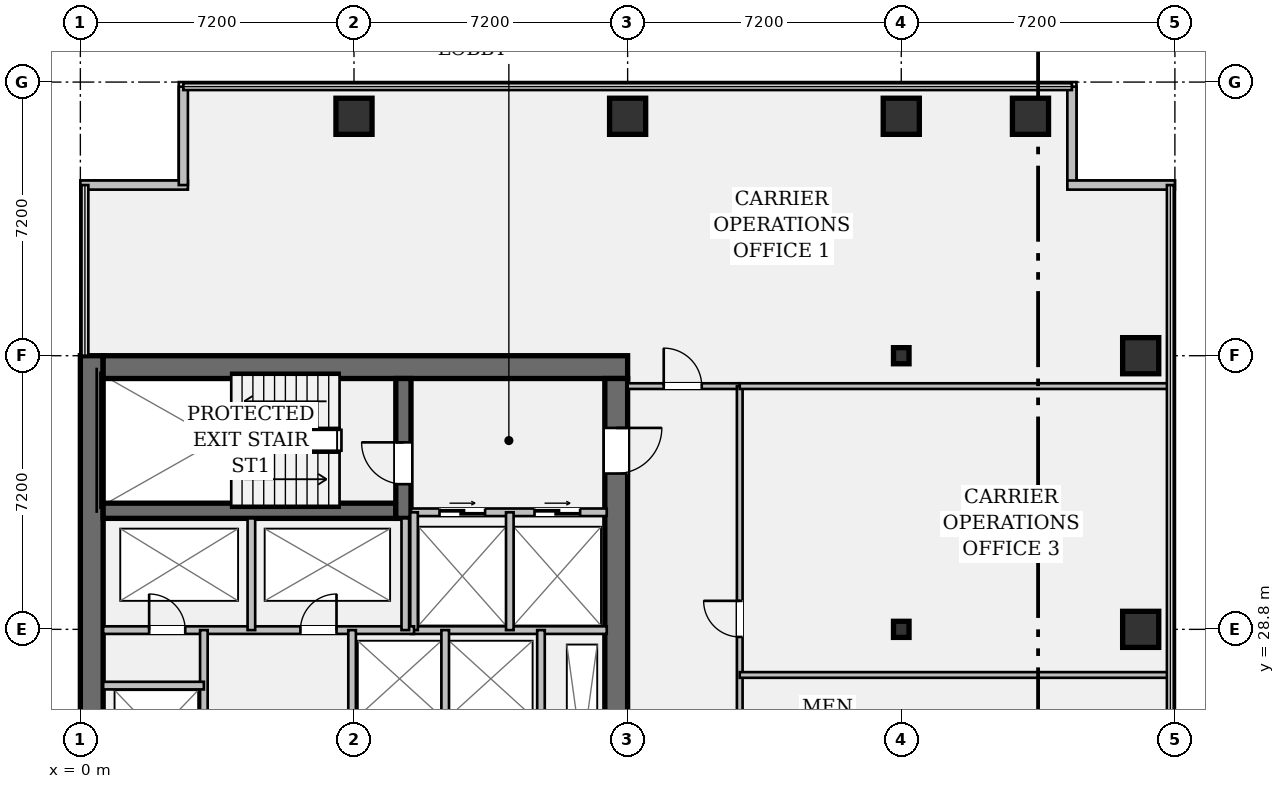
"""IFC4 building model, lengths in metres.
Left out: names, types, materials, properties, quantities, classifications, styles, units other than length and angle.
Written with IfcOpenShell. Run it as: python <this file> out.ifc"""

import sys

from ifc_helpers import new_model, si_unit, direction, frame, frame_2d, origin, origin_2d, place, context, subcontext, project, spatial, rectangle, hollow_rectangle, i_section, extrude, element, fill, save


model = new_model("IFC4")
c1 = context("Model", 3, precision=1e-05, world=origin(), true_north=direction((0.0, 1.0)))
c2 = subcontext(c1, "Body", "Model", "MODEL_VIEW")
j1 = project(units=[si_unit("LENGTHUNIT", "METRE"), si_unit("PLANEANGLEUNIT", "RADIAN")], contexts=[c1])
p1 = place(None, origin())
s1 = spatial("IfcSite", under=j1, at=p1, CompositionType="ELEMENT")
p2 = place(p1, origin())
s2 = spatial("IfcBuilding", under=s1, at=p2, CompositionType="ELEMENT")
p3 = place(p2, frame((0.0, 0.0, 85.05)))
s3 = spatial("IfcBuildingStorey", under=s2, at=p3, CompositionType="ELEMENT", Elevation=85.05)
p4 = place(p3, frame((0.3, 7.2, 0.0), z_axis=(0.0, 0.0, 1.0), x_axis=(0.0, 1.0, 0.0)))
e1 = element("IfcWall", 1, at=p4, inside=s3, PredefinedType="SHEAR", context=c2, shape_type="SweptSolid", body=[
    extrude(rectangle(XDim=28.8, YDim=0.6, at=frame_2d((14.4, 0.0))), origin(), (0.0, 0.0, 1.0), 3.57),
])
p5 = place(p3, frame((0.6, 35.7, 0.0), z_axis=(0.0, 0.0, 1.0), x_axis=(1.0, 0.0, 0.0)))
e2 = element("IfcWall", 2, at=p5, inside=s3, PredefinedType="SHEAR", context=c2, shape_type="SweptSolid", body=[
    extrude(rectangle(XDim=13.8, YDim=0.6, at=frame_2d((6.9, 0.0))), origin(), (0.0, 0.0, 1.0), 3.57),
])
p6 = place(p3, frame((14.1, 35.4, 0.0), z_axis=(0.0, 0.0, 1.0), x_axis=(0.0, -1.0, 0.0)))
e3 = element("IfcWall", 3, at=p6, inside=s3, PredefinedType="SHEAR", context=c2, shape_type="SweptSolid", body=[
    extrude(rectangle(XDim=27.6, YDim=0.6, at=frame_2d((13.8, 0.0))), origin(), (0.0, 0.0, 1.0), 3.57),
])
p7 = place(p6, frame((1.3, 0.0, 0.0)))
e4 = element("IfcOpeningElement", 4, at=p7, cuts=e3, PredefinedType="OPENING", context=c2, shape_type="SweptSolid", body=[
    extrude(rectangle(XDim=1.2, YDim=2.15, at=frame_2d((0.6, 1.075))), frame((0.0, 0.312, 0.0), z_axis=(0.0, -1.0, 0.0), x_axis=(1.0, 0.0, 0.0)), (0.0, 0.0, 1.0), 0.624),
])
p8 = place(p6, frame((25.25, 0.0, 0.0)))
e5 = element("IfcOpeningElement", 5, at=p8, cuts=e3, PredefinedType="OPENING", context=c2, shape_type="SweptSolid", body=[
    extrude(rectangle(XDim=1.2, YDim=2.15, at=frame_2d((0.6, 1.075))), frame((0.0, 0.312, 0.0), z_axis=(0.0, -1.0, 0.0), x_axis=(1.0, 0.0, 0.0)), (0.0, 0.0, 1.0), 0.624),
])
p9 = place(p6, frame((14.6, 0.0, 0.0)))
e6 = element("IfcOpeningElement", 6, at=p9, cuts=e3, PredefinedType="OPENING", context=c2, shape_type="SweptSolid", body=[
    extrude(rectangle(XDim=1.6, YDim=2.2, at=frame_2d((0.8, 1.1))), frame((0.0, 0.312, 0.0), z_axis=(0.0, -1.0, 0.0), x_axis=(1.0, 0.0, 0.0)), (0.0, 0.0, 1.0), 0.624),
])
p10 = place(p3, frame((0.6, 31.92, 0.0), z_axis=(0.0, 0.0, 1.0), x_axis=(1.0, 0.0, 0.0)))
e7 = element("IfcWall", 7, at=p10, inside=s3, PredefinedType="SHEAR", context=c2, shape_type="SweptSolid", body=[
    extrude(rectangle(XDim=7.7, YDim=0.4, at=frame_2d((3.85, 0.0))), origin(), (0.0, 0.0, 1.0), 3.57),
])
p11 = place(p3, frame((8.5, 31.72, 0.0), z_axis=(0.0, 0.0, 1.0), x_axis=(0.0, 1.0, 0.0)))
e8 = element("IfcWall", 8, at=p11, inside=s3, PredefinedType="SHEAR", context=c2, shape_type="SweptSolid", body=[
    extrude(rectangle(XDim=3.68, YDim=0.4, at=frame_2d((1.84, 0.0))), origin(), (0.0, 0.0, 1.0), 3.57),
])
p12 = place(p11, frame((0.9, 0.0, 0.0)))
e9 = element("IfcOpeningElement", 9, at=p12, cuts=e8, PredefinedType="OPENING", context=c2, shape_type="SweptSolid", body=[
    extrude(rectangle(XDim=1.1, YDim=2.15, at=frame_2d((0.55, 1.075))), frame((0.0, 0.212, 0.0), z_axis=(0.0, -1.0, 0.0), x_axis=(1.0, 0.0, 0.0)), (0.0, 0.0, 1.0), 0.424),
])
for number, where, z_axis, x_axis in (
    (10, (7.2, 42.3, 0.0), (0.0, 0.0, 1.0), (1.0, 0.0, 0.0)),
    (11, (14.4, 42.3, 0.0), (0.0, 0.0, 1.0), (1.0, 0.0, 0.0)),
):
    element("IfcColumn", number, at=place(p3, frame(where, z_axis=z_axis, x_axis=x_axis)), inside=s3, PredefinedType="COLUMN", context=c2, shape_type="SweptSolid", body=[
        extrude(hollow_rectangle(XDim=0.95, YDim=0.95, WallThickness=0.06, at=origin_2d()), origin(), (0.0, 0.0, 1.0), 3.57),
    ])
for number, where, z_axis, x_axis in (
    (12, (21.6, 28.8, 0.0), (0.0, 0.0, 1.0), (1.0, 0.0, 0.0)),
    (13, (21.6, 36.0, 0.0), (0.0, 0.0, 1.0), (1.0, 0.0, 0.0)),
):
    element("IfcColumn", number, at=place(p3, frame(where, z_axis=z_axis, x_axis=x_axis)), inside=s3, PredefinedType="COLUMN", context=c2, shape_type="SweptSolid", body=[
        extrude(i_section(OverallWidth=0.409, OverallDepth=0.424, WebThickness=0.033, FlangeThickness=0.052, FilletRadius=0.018, at=origin_2d()), origin(), (0.0, 0.0, 1.0), 3.57),
    ])
for number, where, z_axis, x_axis in (
    (14, (21.6, 42.3, 0.0), (0.0, 0.0, 1.0), (1.0, 0.0, 0.0)),
    (15, (25.0, 42.3, 0.0), (0.0, 0.0, 1.0), (1.0, 0.0, 0.0)),
    (16, (27.9, 28.8, 0.0), (0.0, 0.0, 1.0), (1.0, 0.0, 0.0)),
    (17, (27.9, 36.0, 0.0), (0.0, 0.0, 1.0), (1.0, 0.0, 0.0)),
):
    element("IfcColumn", number, at=place(p3, frame(where, z_axis=z_axis, x_axis=x_axis)), inside=s3, PredefinedType="COLUMN", context=c2, shape_type="SweptSolid", body=[
        extrude(hollow_rectangle(XDim=0.95, YDim=0.95, WallThickness=0.06, at=origin_2d()), origin(), (0.0, 0.0, 1.0), 3.57),
    ])
p13 = place(p3, frame((0.0, 40.49, 0.0), z_axis=(0.0, 0.0, 1.0), x_axis=(1.0, 0.0, 0.0)))
e18 = element("IfcWall", 18, at=p13, inside=s3, PredefinedType="STANDARD", context=c2, shape_type="SweptSolid", body=[
    extrude(rectangle(XDim=2.83, YDim=0.24, at=frame_2d((1.415, 0.0))), origin(), (0.0, 0.0, 1.0), 3.57),
])
for number, where, z_axis, x_axis in (
    (19, (2.71, 40.49, 0.0), (0.0, 0.0, 1.0), (0.0, 1.0, 0.0)),
    (20, (26.09, 43.08, 0.0), (0.0, 0.0, 1.0), (0.0, -1.0, 0.0)),
):
    element("IfcWall", number, at=place(p3, frame(where, z_axis=z_axis, x_axis=x_axis)), inside=s3, PredefinedType="STANDARD", context=c2, shape_type="SweptSolid", body=[
        extrude(rectangle(XDim=2.59, YDim=0.24, at=frame_2d((1.295, 0.0))), origin(), (0.0, 0.0, 1.0), 3.57),
    ])
p14 = place(p3, frame((25.97, 40.49, 0.0), z_axis=(0.0, 0.0, 1.0), x_axis=(1.0, 0.0, 0.0)))
e21 = element("IfcWall", 21, at=p14, inside=s3, PredefinedType="STANDARD", context=c2, shape_type="SweptSolid", body=[
    extrude(rectangle(XDim=2.83, YDim=0.24, at=frame_2d((1.415, 0.0))), origin(), (0.0, 0.0, 1.0), 3.57),
])
p15 = place(p3, frame((8.7, 31.88, 0.0), z_axis=(0.0, 0.0, 1.0), x_axis=(1.0, 0.0, 0.0)))
e22 = element("IfcWall", 22, at=p15, inside=s3, PredefinedType="PARTITIONING", context=c2, shape_type="SweptSolid", body=[
    extrude(rectangle(XDim=5.15, YDim=0.2, at=frame_2d((2.575, 0.0))), origin(), (0.0, 0.0, 1.0), 3.57),
])
p16 = place(p15, frame((0.75, 0.0, 0.0)))
e23 = element("IfcOpeningElement", 23, at=p16, cuts=e22, PredefinedType="OPENING", context=c2, shape_type="SweptSolid", body=[
    extrude(rectangle(XDim=1.2, YDim=2.2, at=frame_2d((0.6, 1.1))), frame((0.0, 0.112, 0.0), z_axis=(0.0, -1.0, 0.0), x_axis=(1.0, 0.0, 0.0)), (0.0, 0.0, 1.0), 0.224),
])
p17 = place(p15, frame((3.25, 0.0, 0.0)))
e24 = element("IfcOpeningElement", 24, at=p17, cuts=e22, PredefinedType="OPENING", context=c2, shape_type="SweptSolid", body=[
    extrude(rectangle(XDim=1.2, YDim=2.2, at=frame_2d((0.6, 1.1))), frame((0.0, 0.112, 0.0), z_axis=(0.0, -1.0, 0.0), x_axis=(1.0, 0.0, 0.0)), (0.0, 0.0, 1.0), 0.224),
])
p18 = place(p3, frame((8.7, 28.78, 0.0), z_axis=(0.0, 0.0, 1.0), x_axis=(1.0, 0.0, 0.0)))
e25 = element("IfcWall", 25, at=p18, inside=s3, PredefinedType="PARTITIONING", context=c2, shape_type="SweptSolid", body=[
    extrude(rectangle(XDim=5.15, YDim=0.2, at=frame_2d((2.575, 0.0))), origin(), (0.0, 0.0, 1.0), 3.57),
])
for number, where, z_axis, x_axis in (
    (26, (8.78, 28.78, 0.0), (0.0, 0.0, 1.0), (0.0, 1.0, 0.0)),
    (27, (11.3, 28.78, 0.0), (0.0, 0.0, 1.0), (0.0, 1.0, 0.0)),
):
    element("IfcWall", number, at=place(p3, frame(where, z_axis=z_axis, x_axis=x_axis)), inside=s3, PredefinedType="PARTITIONING", context=c2, shape_type="SweptSolid", body=[
        extrude(rectangle(XDim=3.1, YDim=0.2, at=frame_2d((1.55, 0.0))), origin(), (0.0, 0.0, 1.0), 3.57),
    ])
p19 = place(p3, frame((0.6, 28.78, 0.0), z_axis=(0.0, 0.0, 1.0), x_axis=(1.0, 0.0, 0.0)))
e28 = element("IfcWall", 28, at=p19, inside=s3, PredefinedType="PARTITIONING", context=c2, shape_type="SweptSolid", body=[
    extrude(rectangle(XDim=8.18, YDim=0.2, at=frame_2d((4.09, 0.0))), origin(), (0.0, 0.0, 1.0), 3.57),
])
p20 = place(p19, frame((1.21, 0.0, 0.0)))
e29 = element("IfcOpeningElement", 29, at=p20, cuts=e28, PredefinedType="OPENING", context=c2, shape_type="SweptSolid", body=[
    extrude(rectangle(XDim=0.95, YDim=2.15, at=frame_2d((0.475, 1.075))), frame((0.0, 0.112, 0.0), z_axis=(0.0, -1.0, 0.0), x_axis=(1.0, 0.0, 0.0)), (0.0, 0.0, 1.0), 0.224),
])
p21 = place(p19, frame((5.19, 0.0, 0.0)))
e30 = element("IfcOpeningElement", 30, at=p21, cuts=e28, PredefinedType="OPENING", context=c2, shape_type="SweptSolid", body=[
    extrude(rectangle(XDim=0.95, YDim=2.15, at=frame_2d((0.475, 1.075))), frame((0.0, 0.112, 0.0), z_axis=(0.0, -1.0, 0.0), x_axis=(1.0, 0.0, 0.0)), (0.0, 0.0, 1.0), 0.224),
])
for number, where, z_axis, x_axis in (
    (31, (4.5, 28.78, 0.0), (0.0, 0.0, 1.0), (0.0, 1.0, 0.0)),
    (32, (8.55, 28.78, 0.0), (0.0, 0.0, 1.0), (0.0, 1.0, 0.0)),
):
    element("IfcWall", number, at=place(p3, frame(where, z_axis=z_axis, x_axis=x_axis)), inside=s3, PredefinedType="PARTITIONING", context=c2, shape_type="SweptSolid", body=[
        extrude(rectangle(XDim=2.94, YDim=0.2, at=frame_2d((1.47, 0.0))), origin(), (0.0, 0.0, 1.0), 3.57),
    ])
p22 = place(p3, frame((3.25, 15.7, 0.0), z_axis=(0.0, 0.0, 1.0), x_axis=(0.0, 1.0, 0.0)))
e33 = element("IfcWall", 33, at=p22, inside=s3, PredefinedType="PARTITIONING", context=c2, shape_type="SweptSolid", body=[
    extrude(rectangle(XDim=13.08, YDim=0.2, at=frame_2d((6.54, 0.0))), origin(), (0.0, 0.0, 1.0), 3.57),
])
p23 = place(p3, frame((0.6, 27.32, 0.0), z_axis=(0.0, 0.0, 1.0), x_axis=(1.0, 0.0, 0.0)))
e34 = element("IfcWall", 34, at=p23, inside=s3, PredefinedType="PARTITIONING", context=c2, shape_type="SweptSolid", body=[
    extrude(rectangle(XDim=2.65, YDim=0.2, at=frame_2d((1.325, 0.0))), origin(), (0.0, 0.0, 1.0), 3.57),
])
for number, where, z_axis, x_axis in (
    (35, (7.15, 26.4, 0.0), (0.0, 0.0, 1.0), (0.0, 1.0, 0.0)),
    (36, (9.6, 26.4, 0.0), (0.0, 0.0, 1.0), (0.0, 1.0, 0.0)),
):
    element("IfcWall", number, at=place(p3, frame(where, z_axis=z_axis, x_axis=x_axis)), inside=s3, PredefinedType="PARTITIONING", context=c2, shape_type="SweptSolid", body=[
        extrude(rectangle(XDim=2.38, YDim=0.2, at=frame_2d((1.19, 0.0))), origin(), (0.0, 0.0, 1.0), 3.57),
    ])
p24 = place(p3, frame((12.12, 22.2, 0.0), z_axis=(0.0, 0.0, 1.0), x_axis=(0.0, 1.0, 0.0)))
e37 = element("IfcWall", 37, at=p24, inside=s3, PredefinedType="PARTITIONING", context=c2, shape_type="SweptSolid", body=[
    extrude(rectangle(XDim=6.58, YDim=0.2, at=frame_2d((3.29, 0.0))), origin(), (0.0, 0.0, 1.0), 3.57),
])
p25 = place(p24, frame((2.75, 0.0, 0.0)))
e38 = element("IfcOpeningElement", 38, at=p25, cuts=e37, PredefinedType="OPENING", context=c2, shape_type="SweptSolid", body=[
    extrude(rectangle(XDim=0.85, YDim=2.15, at=frame_2d((0.425, 1.075))), frame((0.0, 0.112, 0.0), z_axis=(0.0, -1.0, 0.0), x_axis=(1.0, 0.0, 0.0)), (0.0, 0.0, 1.0), 0.224),
])
p26 = place(p3, frame((14.4, 35.2, 0.0), z_axis=(0.0, 0.0, 1.0), x_axis=(1.0, 0.0, 0.0)))
e39 = element("IfcWall", 39, at=p26, inside=s3, PredefinedType="PARTITIONING", context=c2, shape_type="SweptSolid", body=[
    extrude(rectangle(XDim=2.95, YDim=0.15, at=frame_2d((1.475, 0.0))), origin(), (0.0, 0.0, 1.0), 3.088),
])
p27 = place(p26, frame((0.95, 0.0, 0.0)))
e40 = element("IfcOpeningElement", 40, at=p27, cuts=e39, PredefinedType="OPENING", context=c2, shape_type="SweptSolid", body=[
    extrude(rectangle(XDim=1.0, YDim=2.15, at=frame_2d((0.5, 1.075))), frame((0.0, 0.087, 0.0), z_axis=(0.0, -1.0, 0.0), x_axis=(1.0, 0.0, 0.0)), (0.0, 0.0, 1.0), 0.174),
])
p28 = place(p3, frame((17.35, 12.4, 0.0), z_axis=(0.0, 0.0, 1.0), x_axis=(0.0, 1.0, 0.0)))
e41 = element("IfcWall", 41, at=p28, inside=s3, PredefinedType="PARTITIONING", context=c2, shape_type="SweptSolid", body=[
    extrude(rectangle(XDim=22.8, YDim=0.15, at=frame_2d((11.4, 0.0))), origin(), (0.0, 0.0, 1.0), 2.783),
])
p29 = place(p28, frame((4.3, 0.0, 0.0)))
e42 = element("IfcOpeningElement", 42, at=p29, cuts=e41, PredefinedType="OPENING", context=c2, shape_type="SweptSolid", body=[
    extrude(rectangle(XDim=0.95, YDim=2.15, at=frame_2d((0.475, 1.075))), frame((0.0, 0.087, 0.0), z_axis=(0.0, -1.0, 0.0), x_axis=(1.0, 0.0, 0.0)), (0.0, 0.0, 1.0), 0.174),
])
p30 = place(p28, frame((8.0, 0.0, 0.0)))
e43 = element("IfcOpeningElement", 43, at=p30, cuts=e41, PredefinedType="OPENING", context=c2, shape_type="SweptSolid", body=[
    extrude(rectangle(XDim=0.95, YDim=2.15, at=frame_2d((0.475, 1.075))), frame((0.0, 0.087, 0.0), z_axis=(0.0, -1.0, 0.0), x_axis=(1.0, 0.0, 0.0)), (0.0, 0.0, 1.0), 0.174),
])
p31 = place(p28, frame((16.2, 0.0, 0.0)))
e44 = element("IfcOpeningElement", 44, at=p31, cuts=e41, PredefinedType="OPENING", context=c2, shape_type="SweptSolid", body=[
    extrude(rectangle(XDim=0.95, YDim=2.15, at=frame_2d((0.475, 1.075))), frame((0.0, 0.087, 0.0), z_axis=(0.0, -1.0, 0.0), x_axis=(1.0, 0.0, 0.0)), (0.0, 0.0, 1.0), 0.174),
])
for number, where, z_axis, x_axis in (
    (45, (17.35, 35.2, 0.0), (0.0, 0.0, 1.0), (1.0, 0.0, 0.0)),
    (46, (17.35, 27.6, 0.0), (0.0, 0.0, 1.0), (1.0, 0.0, 0.0)),
):
    element("IfcWall", number, at=place(p3, frame(where, z_axis=z_axis, x_axis=x_axis)), inside=s3, PredefinedType="PARTITIONING", context=c2, shape_type="SweptSolid", body=[
        extrude(rectangle(XDim=11.33, YDim=0.15, at=frame_2d((5.665, 0.0))), origin(), (0.0, 0.0, 1.0), 2.783),
    ])
p32 = place(p12, origin())
e47 = element("IfcDoor", 47, at=p32, inside=s3, OperationType="SINGLE_SWING_RIGHT", PredefinedType="DOOR", context=c2, shape_type="SweptSolid", body=[
    extrude(rectangle(XDim=1.1, YDim=2.15, at=frame_2d((0.55, 1.075))), frame((0.0, 0.025, 0.0), z_axis=(0.0, -1.0, 0.0), x_axis=(1.0, 0.0, 0.0)), (0.0, 0.0, 1.0), 0.05),
])
fill(e9, e47)
p33 = place(p7, origin())
e48 = element("IfcDoor", 48, at=p33, inside=s3, OperationType="SINGLE_SWING_LEFT", PredefinedType="DOOR", context=c2, shape_type="SweptSolid", body=[
    extrude(rectangle(XDim=1.2, YDim=2.15, at=frame_2d((0.6, 1.075))), frame((0.0, 0.025, 0.0), z_axis=(0.0, -1.0, 0.0), x_axis=(1.0, 0.0, 0.0)), (0.0, 0.0, 1.0), 0.05),
])
fill(e4, e48)
p34 = place(p16, origin())
e49 = element("IfcDoor", 49, at=p34, inside=s3, OperationType="DOUBLE_DOOR_SLIDING", PredefinedType="DOOR", context=c2, shape_type="SweptSolid", body=[
    extrude(rectangle(XDim=1.2, YDim=2.2, at=frame_2d((0.6, 1.1))), frame((0.0, 0.025, 0.0), z_axis=(0.0, -1.0, 0.0), x_axis=(1.0, 0.0, 0.0)), (0.0, 0.0, 1.0), 0.05),
])
fill(e23, e49)
p35 = place(p17, origin())
e50 = element("IfcDoor", 50, at=p35, inside=s3, OperationType="DOUBLE_DOOR_SLIDING", PredefinedType="DOOR", context=c2, shape_type="SweptSolid", body=[
    extrude(rectangle(XDim=1.2, YDim=2.2, at=frame_2d((0.6, 1.1))), frame((0.0, 0.025, 0.0), z_axis=(0.0, -1.0, 0.0), x_axis=(1.0, 0.0, 0.0)), (0.0, 0.0, 1.0), 0.05),
])
fill(e24, e50)
p36 = place(p20, origin())
e51 = element("IfcDoor", 51, at=p36, inside=s3, OperationType="SINGLE_SWING_LEFT", PredefinedType="DOOR", context=c2, shape_type="SweptSolid", body=[
    extrude(rectangle(XDim=0.95, YDim=2.15, at=frame_2d((0.475, 1.075))), frame((0.0, 0.025, 0.0), z_axis=(0.0, -1.0, 0.0), x_axis=(1.0, 0.0, 0.0)), (0.0, 0.0, 1.0), 0.05),
])
fill(e29, e51)
p37 = place(p21, origin())
e52 = element("IfcDoor", 52, at=p37, inside=s3, OperationType="SINGLE_SWING_RIGHT", PredefinedType="DOOR", context=c2, shape_type="SweptSolid", body=[
    extrude(rectangle(XDim=0.95, YDim=2.15, at=frame_2d((0.475, 1.075))), frame((0.0, 0.025, 0.0), z_axis=(0.0, -1.0, 0.0), x_axis=(1.0, 0.0, 0.0)), (0.0, 0.0, 1.0), 0.05),
])
fill(e30, e52)
p38 = place(p27, origin())
e53 = element("IfcDoor", 53, at=p38, inside=s3, OperationType="SINGLE_SWING_LEFT", PredefinedType="DOOR", context=c2, shape_type="SweptSolid", body=[
    extrude(rectangle(XDim=1.0, YDim=2.15, at=frame_2d((0.5, 1.075))), frame((0.0, 0.025, 0.0), z_axis=(0.0, -1.0, 0.0), x_axis=(1.0, 0.0, 0.0)), (0.0, 0.0, 1.0), 0.05),
])
fill(e40, e53)
p39 = place(p31, origin())
e54 = element("IfcDoor", 54, at=p39, inside=s3, OperationType="SINGLE_SWING_RIGHT", PredefinedType="DOOR", context=c2, shape_type="SweptSolid", body=[
    extrude(rectangle(XDim=0.95, YDim=2.15, at=frame_2d((0.475, 1.075))), frame((0.0, 0.025, 0.0), z_axis=(0.0, -1.0, 0.0), x_axis=(1.0, 0.0, 0.0)), (0.0, 0.0, 1.0), 0.05),
])
fill(e44, e54)
save(model, sys.argv[1])
